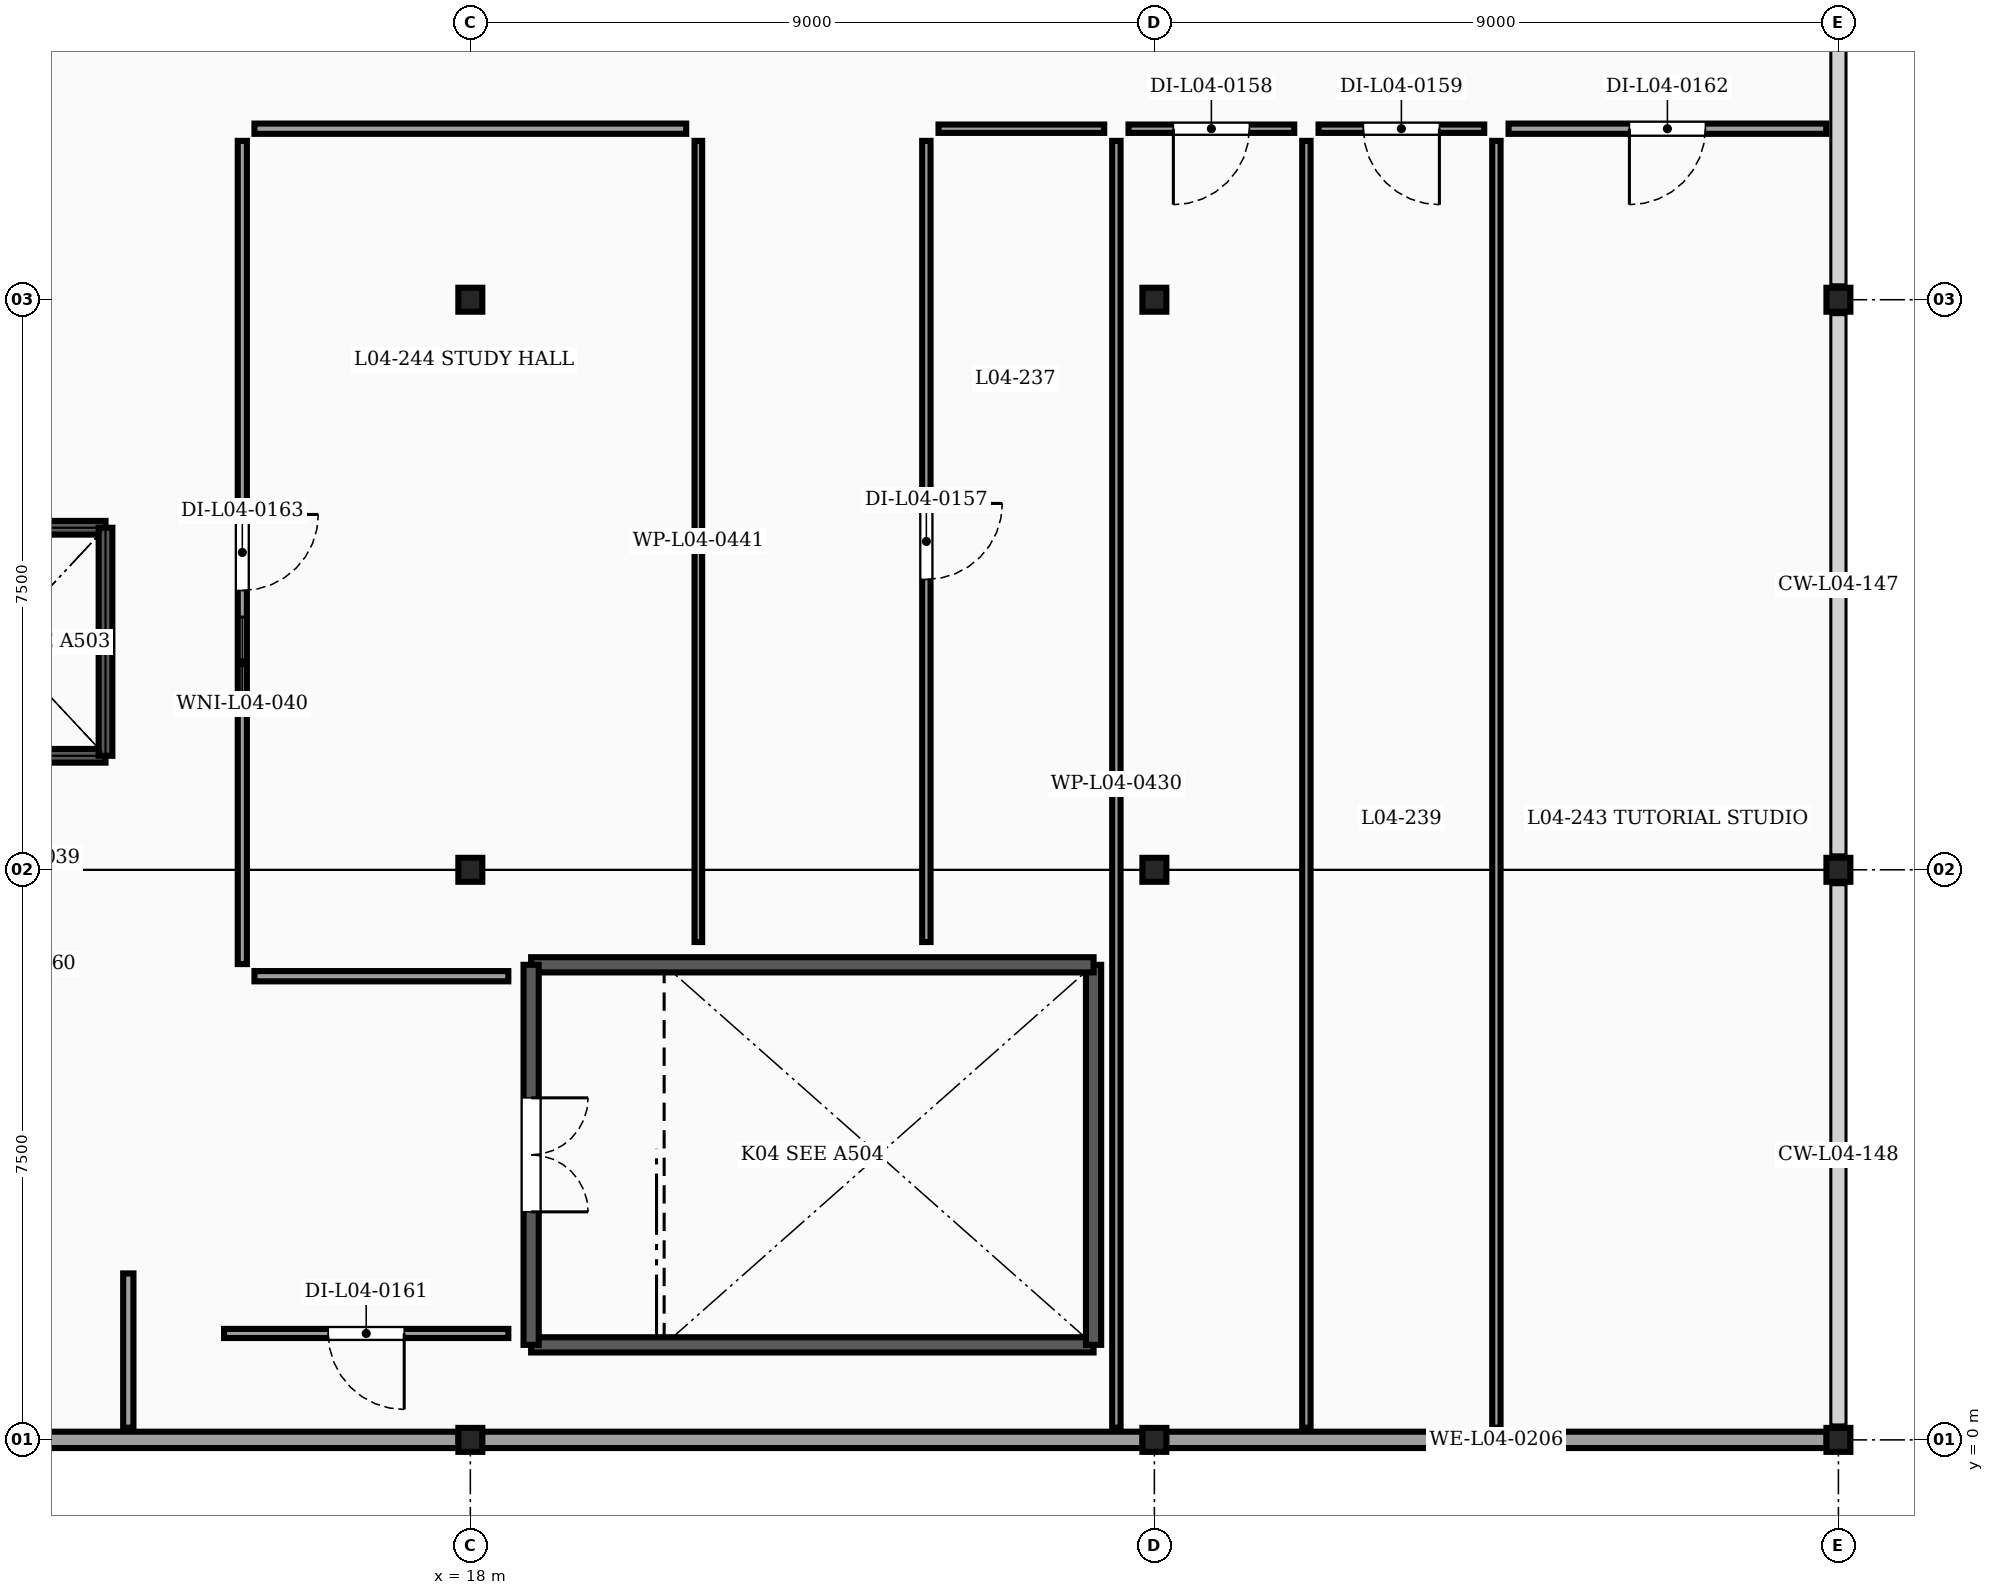
"""IFC4 building model, lengths in metres.
Left out: names, types, materials, properties, quantities, classifications, styles, units other than length and angle.
Written with IfcOpenShell. Run it as: python <this file> out.ifc"""

import sys

from ifc_helpers import new_model, si_unit, direction, frame, frame_2d, origin, origin_2d, place, context, subcontext, project, spatial, rectangle, extrude, element, fill, save


model = new_model("IFC4")
c1 = context("Model", 3, precision=1e-05, world=origin(), true_north=direction((0.0, 1.0)))
c2 = subcontext(c1, "Body", "Model", "MODEL_VIEW")
j1 = project(units=[si_unit("LENGTHUNIT", "METRE"), si_unit("PLANEANGLEUNIT", "RADIAN")], contexts=[c1])
p1 = place(None, origin())
s1 = spatial("IfcSite", under=j1, at=p1, CompositionType="ELEMENT")
p2 = place(p1, origin())
s2 = spatial("IfcBuilding", under=s1, at=p2, CompositionType="ELEMENT")
p3 = place(p2, frame((0.0, 0.0, 16.1)))
s3 = spatial("IfcBuildingStorey", under=s2, at=p3, CompositionType="ELEMENT", Elevation=16.1)
for number, where, z_axis, x_axis in (
    (1, (18.0, 0.0, 0.0), (0.0, 0.0, 1.0), (1.0, 0.0, 0.0)),
    (2, (27.0, 0.0, 0.0), (0.0, 0.0, 1.0), (1.0, 0.0, 0.0)),
    (3, (36.0, 0.0, 0.0), (0.0, 0.0, 1.0), (1.0, 0.0, 0.0)),
    (4, (18.0, 7.5, 0.0), (0.0, 0.0, 1.0), (1.0, 0.0, 0.0)),
    (5, (27.0, 7.5, 0.0), (0.0, 0.0, 1.0), (1.0, 0.0, 0.0)),
    (6, (36.0, 7.5, 0.0), (0.0, 0.0, 1.0), (1.0, 0.0, 0.0)),
    (7, (18.0, 15.0, 0.0), (0.0, 0.0, 1.0), (1.0, 0.0, 0.0)),
    (8, (27.0, 15.0, 0.0), (0.0, 0.0, 1.0), (1.0, 0.0, 0.0)),
    (9, (36.0, 15.0, 0.0), (0.0, 0.0, 1.0), (1.0, 0.0, 0.0)),
):
    element("IfcColumn", number, at=place(p3, frame(where, z_axis=z_axis, x_axis=x_axis)), inside=s3, PredefinedType="COLUMN", context=c2, shape_type="SweptSolid", body=[
        extrude(rectangle(XDim=0.315, YDim=0.315, at=origin_2d()), origin(), (0.0, 0.0, 1.0), 3.65),
    ])
for number, where, z_axis, x_axis in (
    (10, (35.846, 0.0, 0.0), (0.0, 0.0, 1.0), (-1.0, 0.0, 0.0)),
    (11, (26.846, 0.0, 0.0), (0.0, 0.0, 1.0), (-1.0, 0.0, 0.0)),
    (12, (17.846, 0.0, 0.0), (0.0, 0.0, 1.0), (-1.0, 0.0, 0.0)),
):
    element("IfcWall", number, at=place(p3, frame(where, z_axis=z_axis, x_axis=x_axis)), inside=s3, PredefinedType="SOLIDWALL", context=c2, shape_type="SweptSolid", body=[
        extrude(rectangle(XDim=8.693, YDim=0.215, at=frame_2d((4.346, 0.0))), origin(), (0.0, 0.0, 1.0), 3.057),
    ])
p4 = place(p3, frame((18.8, 1.25, 0.0), z_axis=(0.0, 0.0, 1.0), x_axis=(1.0, 0.0, 0.0)))
e13 = element("IfcWall", 13, at=p4, inside=s3, PredefinedType="SHEAR", context=c2, shape_type="SweptSolid", body=[
    extrude(rectangle(XDim=7.4, YDim=0.2, at=frame_2d((3.7, 0.0))), origin(), (0.0, 0.0, 1.0), 3.65),
])
p5 = place(p3, frame((26.2, 1.25, 0.0), z_axis=(0.0, 0.0, 1.0), x_axis=(0.0, 1.0, 0.0)))
e14 = element("IfcWall", 14, at=p5, inside=s3, PredefinedType="SHEAR", context=c2, shape_type="SweptSolid", body=[
    extrude(rectangle(XDim=5.0, YDim=0.2, at=frame_2d((2.5, 0.0))), origin(), (0.0, 0.0, 1.0), 3.65),
])
p6 = place(p3, frame((26.2, 6.25, 0.0), z_axis=(0.0, 0.0, 1.0), x_axis=(-1.0, 0.0, 0.0)))
e15 = element("IfcWall", 15, at=p6, inside=s3, PredefinedType="SHEAR", context=c2, shape_type="SweptSolid", body=[
    extrude(rectangle(XDim=7.4, YDim=0.2, at=frame_2d((3.7, 0.0))), origin(), (0.0, 0.0, 1.0), 3.65),
])
p7 = place(p3, frame((18.8, 6.25, 0.0), z_axis=(0.0, 0.0, 1.0), x_axis=(0.0, -1.0, 0.0)))
e16 = element("IfcWall", 16, at=p7, inside=s3, PredefinedType="SHEAR", context=c2, shape_type="SweptSolid", body=[
    extrude(rectangle(XDim=5.0, YDim=0.2, at=frame_2d((2.5, 0.0))), origin(), (0.0, 0.0, 1.0), 3.65),
])
p8 = place(p7, frame((1.75, 0.0, 0.0)))
e17 = element("IfcOpeningElement", 17, at=p8, cuts=e16, PredefinedType="OPENING", context=c2, shape_type="SweptSolid", body=[
    extrude(rectangle(XDim=1.5, YDim=2.15, at=frame_2d((0.75, 1.075))), frame((0.0, 0.11, 0.0), z_axis=(0.0, -1.0, 0.0), x_axis=(1.0, 0.0, 0.0)), (0.0, 0.0, 1.0), 0.22),
])
p9 = place(p3, frame((13.2, 9.0, 0.0), z_axis=(0.0, 0.0, 1.0), x_axis=(-1.0, 0.0, 0.0)))
e18 = element("IfcWall", 18, at=p9, inside=s3, PredefinedType="SHEAR", context=c2, shape_type="SweptSolid", body=[
    extrude(rectangle(XDim=2.8, YDim=0.18, at=frame_2d((1.4, 0.0))), origin(), (0.0, 0.0, 1.0), 3.65),
])
p10 = place(p3, frame((10.4, 12.0, 0.0), z_axis=(0.0, 0.0, 1.0), x_axis=(1.0, 0.0, 0.0)))
e19 = element("IfcWall", 19, at=p10, inside=s3, PredefinedType="SHEAR", context=c2, shape_type="SweptSolid", body=[
    extrude(rectangle(XDim=2.8, YDim=0.18, at=frame_2d((1.4, 0.0))), origin(), (0.0, 0.0, 1.0), 3.65),
])
p11 = place(p10, frame((0.85, 0.0, 0.0)))
e20 = element("IfcOpeningElement", 20, at=p11, cuts=e19, PredefinedType="OPENING", context=c2, shape_type="SweptSolid", body=[
    extrude(rectangle(XDim=1.1, YDim=2.15, at=frame_2d((0.55, 1.075))), frame((0.0, 0.1, 0.0), z_axis=(0.0, -1.0, 0.0), x_axis=(1.0, 0.0, 0.0)), (0.0, 0.0, 1.0), 0.2),
])
p12 = place(p3, frame((13.2, 12.0, 0.0), z_axis=(0.0, 0.0, 1.0), x_axis=(0.0, -1.0, 0.0)))
e21 = element("IfcWall", 21, at=p12, inside=s3, PredefinedType="SHEAR", context=c2, shape_type="SweptSolid", body=[
    extrude(rectangle(XDim=3.0, YDim=0.18, at=frame_2d((1.5, 0.0))), origin(), (0.0, 0.0, 1.0), 3.65),
])
p13 = place(p3, frame((26.5, 0.16, 0.0), z_axis=(0.0, 0.0, 1.0), x_axis=(0.0, 1.0, 0.0)))
e22 = element("IfcWall", 22, at=p13, inside=s3, PredefinedType="PARTITIONING", context=c2, shape_type="SweptSolid", body=[
    extrude(rectangle(XDim=16.93, YDim=0.11, at=frame_2d((8.465, 0.0))), origin(), (0.0, 0.0, 1.0), 3.65),
])
p14 = place(p3, frame((24.0, 17.09, 0.0), z_axis=(0.0, 0.0, 1.0), x_axis=(0.0, -1.0, 0.0)))
e23 = element("IfcWall", 23, at=p14, inside=s3, PredefinedType="PARTITIONING", context=c2, shape_type="SweptSolid", body=[
    extrude(rectangle(XDim=10.54, YDim=0.11, at=frame_2d((5.27, 0.0))), origin(), (0.0, 0.0, 1.0), 3.342),
])
p15 = place(p14, frame((4.77, 0.0, 0.0)))
e24 = element("IfcOpeningElement", 24, at=p15, cuts=e23, PredefinedType="OPENING", context=c2, shape_type="SweptSolid", body=[
    extrude(rectangle(XDim=1.0, YDim=2.15, at=frame_2d((0.5, 1.075))), frame((0.0, 0.065, 0.0), z_axis=(0.0, -1.0, 0.0), x_axis=(1.0, 0.0, 0.0)), (0.0, 0.0, 1.0), 0.13),
])
p16 = place(p3, frame((26.34, 17.25, 0.0), z_axis=(0.0, 0.0, 1.0), x_axis=(-1.0, 0.0, 0.0)))
e25 = element("IfcWall", 25, at=p16, inside=s3, PredefinedType="PARTITIONING", context=c2, shape_type="SweptSolid", body=[
    extrude(rectangle(XDim=2.18, YDim=0.11, at=frame_2d((1.09, 0.0))), origin(), (0.0, 0.0, 1.0), 3.65),
])
p17 = place(p3, frame((29.0, 0.16, 0.0), z_axis=(0.0, 0.0, 1.0), x_axis=(0.0, 1.0, 0.0)))
e26 = element("IfcWall", 26, at=p17, inside=s3, PredefinedType="PARTITIONING", context=c2, shape_type="SweptSolid", body=[
    extrude(rectangle(XDim=16.93, YDim=0.11, at=frame_2d((8.465, 0.0))), origin(), (0.0, 0.0, 1.0), 3.65),
])
p18 = place(p3, frame((28.84, 17.25, 0.0), z_axis=(0.0, 0.0, 1.0), x_axis=(-1.0, 0.0, 0.0)))
e27 = element("IfcWall", 27, at=p18, inside=s3, PredefinedType="PARTITIONING", context=c2, shape_type="SweptSolid", body=[
    extrude(rectangle(XDim=2.18, YDim=0.11, at=frame_2d((1.09, 0.0))), origin(), (0.0, 0.0, 1.0), 3.65),
])
p19 = place(p18, frame((0.59, 0.0, 0.0)))
e28 = element("IfcOpeningElement", 28, at=p19, cuts=e27, PredefinedType="OPENING", context=c2, shape_type="SweptSolid", body=[
    extrude(rectangle(XDim=1.0, YDim=2.15, at=frame_2d((0.5, 1.075))), frame((0.0, 0.065, 0.0), z_axis=(0.0, -1.0, 0.0), x_axis=(1.0, 0.0, 0.0)), (0.0, 0.0, 1.0), 0.13),
])
p20 = place(p3, frame((31.34, 17.25, 0.0), z_axis=(0.0, 0.0, 1.0), x_axis=(-1.0, 0.0, 0.0)))
e29 = element("IfcWall", 29, at=p20, inside=s3, PredefinedType="PARTITIONING", context=c2, shape_type="SweptSolid", body=[
    extrude(rectangle(XDim=2.18, YDim=0.11, at=frame_2d((1.09, 0.0))), origin(), (0.0, 0.0, 1.0), 3.65),
])
p21 = place(p20, frame((0.59, 0.0, 0.0)))
e30 = element("IfcOpeningElement", 30, at=p21, cuts=e29, PredefinedType="OPENING", context=c2, shape_type="SweptSolid", body=[
    extrude(rectangle(XDim=1.0, YDim=2.15, at=frame_2d((0.5, 1.075))), frame((0.0, 0.065, 0.0), z_axis=(0.0, -1.0, 0.0), x_axis=(1.0, 0.0, 0.0)), (0.0, 0.0, 1.0), 0.13),
])
p22 = place(p3, frame((31.5, 0.16, 0.0), z_axis=(0.0, 0.0, 1.0), x_axis=(0.0, 1.0, 0.0)))
e31 = element("IfcWall", 31, at=p22, inside=s3, PredefinedType="PARTITIONING", context=c2, shape_type="SweptSolid", body=[
    extrude(rectangle(XDim=16.93, YDim=0.11, at=frame_2d((8.465, 0.0))), origin(), (0.0, 0.0, 1.0), 3.65),
])
p23 = place(p3, frame((18.5, 1.4, 0.0), z_axis=(0.0, 0.0, 1.0), x_axis=(-1.0, 0.0, 0.0)))
e32 = element("IfcWall", 32, at=p23, inside=s3, PredefinedType="PARTITIONING", context=c2, shape_type="SweptSolid", body=[
    extrude(rectangle(XDim=3.74, YDim=0.12, at=frame_2d((1.87, 0.0))), origin(), (0.0, 0.0, 1.0), 3.65),
])
p24 = place(p23, frame((1.37, 0.0, 0.0)))
e33 = element("IfcOpeningElement", 33, at=p24, cuts=e32, PredefinedType="OPENING", context=c2, shape_type="SweptSolid", body=[
    extrude(rectangle(XDim=1.0, YDim=2.15, at=frame_2d((0.5, 1.075))), frame((0.0, 0.07, 0.0), z_axis=(0.0, -1.0, 0.0), x_axis=(1.0, 0.0, 0.0)), (0.0, 0.0, 1.0), 0.14),
])
p25 = place(p3, frame((35.84, 17.25, 0.0), z_axis=(0.0, 0.0, 1.0), x_axis=(-1.0, 0.0, 0.0)))
e34 = element("IfcWall", 34, at=p25, inside=s3, PredefinedType="PARTITIONING", context=c2, shape_type="SweptSolid", body=[
    extrude(rectangle(XDim=4.18, YDim=0.135, at=frame_2d((2.09, 0.0))), origin(), (0.0, 0.0, 1.0), 3.65),
])
p26 = place(p25, frame((1.59, 0.0, 0.0)))
e35 = element("IfcOpeningElement", 35, at=p26, cuts=e34, PredefinedType="OPENING", context=c2, shape_type="SweptSolid", body=[
    extrude(rectangle(XDim=1.0, YDim=2.15, at=frame_2d((0.5, 1.075))), frame((0.0, 0.077, 0.0), z_axis=(0.0, -1.0, 0.0), x_axis=(1.0, 0.0, 0.0)), (0.0, 0.0, 1.0), 0.155),
])
p27 = place(p3, frame((21.0, 6.55, 0.0), z_axis=(0.0, 0.0, 1.0), x_axis=(0.0, 1.0, 0.0)))
e36 = element("IfcWall", 36, at=p27, inside=s3, PredefinedType="PARTITIONING", context=c2, shape_type="SweptSolid", body=[
    extrude(rectangle(XDim=10.54, YDim=0.1, at=frame_2d((5.27, 0.0))), origin(), (0.0, 0.0, 1.0), 3.342),
])
p28 = place(p3, frame((20.84, 17.25, 0.0), z_axis=(0.0, 0.0, 1.0), x_axis=(-1.0, 0.0, 0.0)))
e37 = element("IfcWall", 37, at=p28, inside=s3, PredefinedType="PARTITIONING", context=c2, shape_type="SweptSolid", body=[
    extrude(rectangle(XDim=5.68, YDim=0.135, at=frame_2d((2.84, 0.0))), origin(), (0.0, 0.0, 1.0), 3.65),
])
p29 = place(p3, frame((15.0, 17.09, 0.0), z_axis=(0.0, 0.0, 1.0), x_axis=(0.0, -1.0, 0.0)))
e38 = element("IfcWall", 38, at=p29, inside=s3, PredefinedType="PARTITIONING", context=c2, shape_type="SweptSolid", body=[
    extrude(rectangle(XDim=10.83, YDim=0.12, at=frame_2d((5.415, 0.0))), origin(), (0.0, 0.0, 1.0), 3.342),
])
p30 = place(p29, frame((4.915, 0.0, 0.0)))
e39 = element("IfcOpeningElement", 39, at=p30, cuts=e38, PredefinedType="OPENING", context=c2, shape_type="SweptSolid", body=[
    extrude(rectangle(XDim=1.0, YDim=2.15, at=frame_2d((0.5, 1.075))), frame((0.0, 0.07, 0.0), z_axis=(0.0, -1.0, 0.0), x_axis=(1.0, 0.0, 0.0)), (0.0, 0.0, 1.0), 0.14),
])
p31 = place(p29, frame((6.265, 0.0, 1.02)))
e40 = element("IfcOpeningElement", 40, at=p31, cuts=e38, PredefinedType="OPENING", context=c2, shape_type="SweptSolid", body=[
    extrude(rectangle(XDim=1.2, YDim=1.15, at=frame_2d((0.6, 0.575))), frame((0.0, 0.07, 0.0), z_axis=(0.0, -1.0, 0.0), x_axis=(1.0, 0.0, 0.0)), (0.0, 0.0, 1.0), 0.14),
])
p32 = place(p3, frame((15.16, 6.1, 0.0), z_axis=(0.0, 0.0, 1.0), x_axis=(1.0, 0.0, 0.0)))
e41 = element("IfcWall", 41, at=p32, inside=s3, PredefinedType="PARTITIONING", context=c2, shape_type="SweptSolid", body=[
    extrude(rectangle(XDim=3.34, YDim=0.135, at=frame_2d((1.67, 0.0))), origin(), (0.0, 0.0, 1.0), 3.65),
])
p33 = place(p3, frame((13.5, 0.16, 0.0), z_axis=(0.0, 0.0, 1.0), x_axis=(0.0, 1.0, 0.0)))
e42 = element("IfcWall", 42, at=p33, inside=s3, PredefinedType="PARTITIONING", context=c2, shape_type="SweptSolid", body=[
    extrude(rectangle(XDim=2.03, YDim=0.135, at=frame_2d((1.015, 0.0))), origin(), (0.0, 0.0, 1.0), 3.65),
])
p34 = place(p8, origin())
e43 = element("IfcDoor", 43, at=p34, inside=s3, OperationType="DOUBLE_DOOR_SINGLE_SWING", PredefinedType="DOOR", context=c2, shape_type="SweptSolid", body=[
    extrude(rectangle(XDim=1.5, YDim=2.15, at=frame_2d((0.75, 1.075))), frame((0.0, 0.025, 0.0), z_axis=(0.0, -1.0, 0.0), x_axis=(1.0, 0.0, 0.0)), (0.0, 0.0, 1.0), 0.05),
])
fill(e17, e43)
p35 = place(p15, origin())
e44 = element("IfcDoor", 44, at=p35, inside=s3, OperationType="SINGLE_SWING_LEFT", PredefinedType="DOOR", context=c2, shape_type="SweptSolid", body=[
    extrude(rectangle(XDim=1.0, YDim=2.15, at=frame_2d((0.5, 1.075))), frame((0.0, 0.025, 0.0), z_axis=(0.0, -1.0, 0.0), x_axis=(1.0, 0.0, 0.0)), (0.0, 0.0, 1.0), 0.05),
])
fill(e24, e44)
p36 = place(p19, origin())
e45 = element("IfcDoor", 45, at=p36, inside=s3, OperationType="SINGLE_SWING_RIGHT", PredefinedType="DOOR", context=c2, shape_type="SweptSolid", body=[
    extrude(rectangle(XDim=1.0, YDim=2.15, at=frame_2d((0.5, 1.075))), frame((0.0, 0.025, 0.0), z_axis=(0.0, -1.0, 0.0), x_axis=(1.0, 0.0, 0.0)), (0.0, 0.0, 1.0), 0.05),
])
fill(e28, e45)
p37 = place(p21, origin())
e46 = element("IfcDoor", 46, at=p37, inside=s3, OperationType="SINGLE_SWING_LEFT", PredefinedType="DOOR", context=c2, shape_type="SweptSolid", body=[
    extrude(rectangle(XDim=1.0, YDim=2.15, at=frame_2d((0.5, 1.075))), frame((0.0, 0.025, 0.0), z_axis=(0.0, -1.0, 0.0), x_axis=(1.0, 0.0, 0.0)), (0.0, 0.0, 1.0), 0.05),
])
fill(e30, e46)
p38 = place(p24, origin())
e47 = element("IfcDoor", 47, at=p38, inside=s3, OperationType="SINGLE_SWING_LEFT", PredefinedType="DOOR", context=c2, shape_type="SweptSolid", body=[
    extrude(rectangle(XDim=1.0, YDim=2.15, at=frame_2d((0.5, 1.075))), frame((0.0, 0.025, 0.0), z_axis=(0.0, -1.0, 0.0), x_axis=(1.0, 0.0, 0.0)), (0.0, 0.0, 1.0), 0.05),
])
fill(e33, e47)
p39 = place(p26, origin())
e48 = element("IfcDoor", 48, at=p39, inside=s3, OperationType="SINGLE_SWING_RIGHT", PredefinedType="DOOR", context=c2, shape_type="SweptSolid", body=[
    extrude(rectangle(XDim=1.0, YDim=2.15, at=frame_2d((0.5, 1.075))), frame((0.0, 0.025, 0.0), z_axis=(0.0, -1.0, 0.0), x_axis=(1.0, 0.0, 0.0)), (0.0, 0.0, 1.0), 0.05),
])
fill(e35, e48)
p40 = place(p30, origin())
e49 = element("IfcDoor", 49, at=p40, inside=s3, OperationType="SINGLE_SWING_LEFT", PredefinedType="DOOR", context=c2, shape_type="SweptSolid", body=[
    extrude(rectangle(XDim=1.0, YDim=2.15, at=frame_2d((0.5, 1.075))), frame((0.0, 0.025, 0.0), z_axis=(0.0, -1.0, 0.0), x_axis=(1.0, 0.0, 0.0)), (0.0, 0.0, 1.0), 0.05),
])
fill(e39, e49)
p41 = place(p31, origin())
e50 = element("IfcWindow", 50, at=p41, inside=s3, PartitioningType="DOUBLE_PANEL_VERTICAL", PredefinedType="WINDOW", context=c2, shape_type="SweptSolid", body=[
    extrude(rectangle(XDim=1.2, YDim=1.15, at=frame_2d((0.6, 0.575))), frame((0.0, 0.03, 0.0), z_axis=(0.0, -1.0, 0.0), x_axis=(1.0, 0.0, 0.0)), (0.0, 0.0, 1.0), 0.06),
])
fill(e40, e50)
save(model, sys.argv[1])
